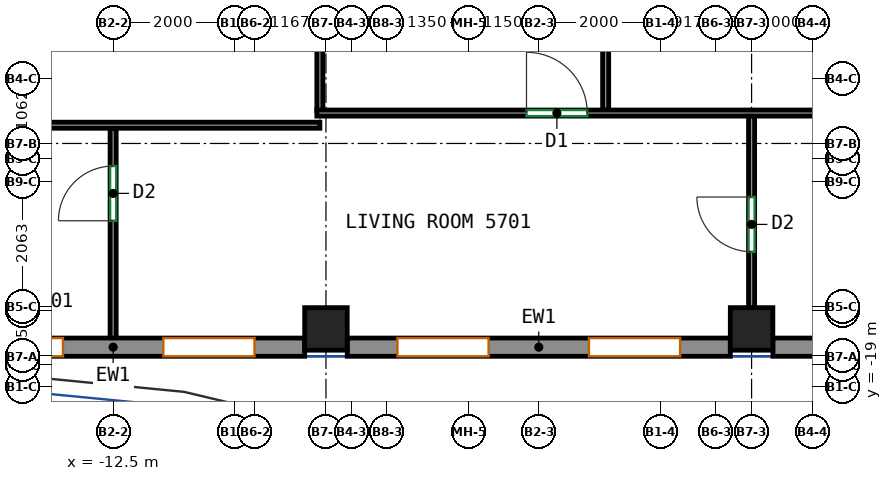
"""IFC4 building model, lengths in metres.
Left out: names, types, materials, properties, quantities, classifications, styles, units other than length and angle.
Written with IfcOpenShell. Run it as: python <this file> out.ifc"""

import sys

from ifc_helpers import new_model, si_unit, direction, frame, frame_2d, origin, origin_2d, place, context, subcontext, project, spatial, rectangle, extrude, source, transform, mapped, element, fill, save


model = new_model("IFC4")
c1 = context("Model", 3, precision=1e-05, world=origin(), true_north=direction((0.0, 1.0)))
c2 = subcontext(c1, "Body", "Model", "MODEL_VIEW")
j1 = project(units=[si_unit("LENGTHUNIT", "METRE"), si_unit("PLANEANGLEUNIT", "RADIAN")], contexts=[c1])
p1 = place(None, origin())
s1 = spatial("IfcSite", under=j1, at=p1, CompositionType="ELEMENT")
p2 = place(p1, origin())
s2 = spatial("IfcBuilding", under=s1, at=p2, CompositionType="ELEMENT")
p3 = place(p2, frame((0.0, 0.0, 239.0)))
s3 = spatial("IfcBuildingStorey", under=s2, at=p3, CompositionType="ELEMENT", Elevation=239.0)
m1 = source(origin(), c2, "Body", "SweptSolid", [
    extrude(rectangle(XDim=0.7, YDim=0.7, at=origin_2d()), origin(), (0.0, 0.0, 1.0), 3.12),
])
for number, where, z_axis, x_axis in (
    (1, (-9.0, -18.05, 0.0), (0.0, 0.0, 1.0), (1.0, 0.0, 0.0)),
    (2, (-2.0, -18.05, 0.0), (0.0, 0.0, 1.0), (1.0, 0.0, 0.0)),
):
    element("IfcColumn", number, at=place(p3, frame(where, z_axis=z_axis, x_axis=x_axis)), inside=s3, PredefinedType="COLUMN", context=c2, shape_type="MappedRepresentation", body=[
        mapped(m1, transform((0.0, 0.0, 0.0))),
    ])
m2 = source(origin(), c2, "Body", "SweptSolid", [
    extrude(rectangle(XDim=6.3, YDim=0.3, at=frame_2d((3.15, 0.0))), origin(), (0.0, 0.0, 1.0), 3.12),
])
p4 = place(p3, frame((-15.65, -18.35, 0.0), z_axis=(0.0, 0.0, 1.0), x_axis=(1.0, 0.0, 0.0)))
e3 = element("IfcWall", 3, at=p4, inside=s3, PredefinedType="SOLIDWALL", context=c2, shape_type="MappedRepresentation", body=[
    mapped(m2, transform((0.0, 0.0, 0.0))),
])
p5 = place(p4, frame((0.825, 0.0, 0.8)))
e4 = element("IfcOpeningElement", 4, at=p5, cuts=e3, PredefinedType="OPENING", context=c2, shape_type="SweptSolid", body=[
    extrude(rectangle(XDim=1.5, YDim=2.05, at=frame_2d((0.75, 1.025))), frame((0.0, 0.16, 0.0), z_axis=(0.0, -1.0, 0.0), x_axis=(1.0, 0.0, 0.0)), (0.0, 0.0, 1.0), 0.32),
])
p6 = place(p4, frame((3.975, 0.0, 0.8)))
e5 = element("IfcOpeningElement", 5, at=p6, cuts=e3, PredefinedType="OPENING", context=c2, shape_type="SweptSolid", body=[
    extrude(rectangle(XDim=1.5, YDim=2.05, at=frame_2d((0.75, 1.025))), frame((0.0, 0.16, 0.0), z_axis=(0.0, -1.0, 0.0), x_axis=(1.0, 0.0, 0.0)), (0.0, 0.0, 1.0), 0.32),
])
p7 = place(p3, frame((-8.65, -18.35, 0.0), z_axis=(0.0, 0.0, 1.0), x_axis=(1.0, 0.0, 0.0)))
e6 = element("IfcWall", 6, at=p7, inside=s3, PredefinedType="SOLIDWALL", context=c2, shape_type="MappedRepresentation", body=[
    mapped(m2, transform((0.0, 0.0, 0.0))),
])
p8 = place(p7, frame((0.825, 0.0, 0.8)))
e7 = element("IfcOpeningElement", 7, at=p8, cuts=e6, PredefinedType="OPENING", context=c2, shape_type="SweptSolid", body=[
    extrude(rectangle(XDim=1.5, YDim=2.05, at=frame_2d((0.75, 1.025))), frame((0.0, 0.16, 0.0), z_axis=(0.0, -1.0, 0.0), x_axis=(1.0, 0.0, 0.0)), (0.0, 0.0, 1.0), 0.32),
])
p9 = place(p7, frame((3.975, 0.0, 0.8)))
e8 = element("IfcOpeningElement", 8, at=p9, cuts=e6, PredefinedType="OPENING", context=c2, shape_type="SweptSolid", body=[
    extrude(rectangle(XDim=1.5, YDim=2.05, at=frame_2d((0.75, 1.025))), frame((0.0, 0.16, 0.0), z_axis=(0.0, -1.0, 0.0), x_axis=(1.0, 0.0, 0.0)), (0.0, 0.0, 1.0), 0.32),
])
p10 = place(p3, frame((-1.65, -18.35, 0.0), z_axis=(0.0, 0.0, 1.0), x_axis=(1.0, 0.0, 0.0)))
e9 = element("IfcWall", 9, at=p10, inside=s3, PredefinedType="SOLIDWALL", context=c2, shape_type="MappedRepresentation", body=[
    mapped(m2, transform((0.0, 0.0, 0.0))),
])
p11 = place(p10, frame((0.825, 0.0, 0.8)))
e10 = element("IfcOpeningElement", 10, at=p11, cuts=e9, PredefinedType="OPENING", context=c2, shape_type="SweptSolid", body=[
    extrude(rectangle(XDim=1.5, YDim=2.05, at=frame_2d((0.75, 1.025))), frame((0.0, 0.16, 0.0), z_axis=(0.0, -1.0, 0.0), x_axis=(1.0, 0.0, 0.0)), (0.0, 0.0, 1.0), 0.32),
])
p12 = place(p10, frame((3.975, 0.0, 0.8)))
e11 = element("IfcOpeningElement", 11, at=p12, cuts=e9, PredefinedType="OPENING", context=c2, shape_type="SweptSolid", body=[
    extrude(rectangle(XDim=1.5, YDim=2.05, at=frame_2d((0.75, 1.025))), frame((0.0, 0.16, 0.0), z_axis=(0.0, -1.0, 0.0), x_axis=(1.0, 0.0, 0.0)), (0.0, 0.0, 1.0), 0.32),
])
p13 = place(p3, frame((-9.1, -14.46, 0.0), z_axis=(0.0, 0.0, 1.0), x_axis=(0.0, 1.0, 0.0)))
e12 = element("IfcWall", 12, at=p13, inside=s3, PredefinedType="PARTITIONING", context=c2, shape_type="SweptSolid", body=[
    extrude(rectangle(XDim=2.583, YDim=0.1, at=frame_2d((1.292, 0.0))), origin(), (0.0, 0.0, 1.0), 3.12),
])
p14 = place(p13, frame((1.383, 0.0, 0.0)))
e13 = element("IfcOpeningElement", 13, at=p14, cuts=e12, PredefinedType="OPENING", context=c2, shape_type="SweptSolid", body=[
    extrude(rectangle(XDim=1.0, YDim=2.1, at=frame_2d((0.5, 1.05))), frame((0.0, 0.06, 0.0), z_axis=(0.0, -1.0, 0.0), x_axis=(1.0, 0.0, 0.0)), (0.0, 0.0, 1.0), 0.12),
])
p15 = place(p3, frame((-13.55, -14.7, 0.0), z_axis=(0.0, 0.0, 1.0), x_axis=(1.0, 0.0, 0.0)))
e14 = element("IfcWall", 14, at=p15, inside=s3, PredefinedType="PARTITIONING", context=c2, shape_type="SweptSolid", body=[
    extrude(rectangle(XDim=4.45, YDim=0.1, at=frame_2d((2.225, 0.0))), origin(), (0.0, 0.0, 1.0), 3.12),
])
p16 = place(p3, frame((-4.4, -14.45, 0.0), z_axis=(0.0, 0.0, 1.0), x_axis=(0.0, 1.0, 0.0)))
e15 = element("IfcWall", 15, at=p16, inside=s3, PredefinedType="PARTITIONING", context=c2, shape_type="SweptSolid", body=[
    extrude(rectangle(XDim=2.573, YDim=0.1, at=frame_2d((1.287, 0.0))), origin(), (0.0, 0.0, 1.0), 3.12),
])
p17 = place(p16, frame((1.266, 0.0, 0.0)))
e16 = element("IfcOpeningElement", 16, at=p17, cuts=e15, PredefinedType="OPENING", context=c2, shape_type="SweptSolid", body=[
    extrude(rectangle(XDim=1.0, YDim=2.1, at=frame_2d((0.5, 1.05))), frame((0.0, 0.06, 0.0), z_axis=(0.0, -1.0, 0.0), x_axis=(1.0, 0.0, 0.0)), (0.0, 0.0, 1.0), 0.12),
])
p18 = place(p3, frame((-9.15, -14.5, 0.0), z_axis=(0.0, 0.0, 1.0), x_axis=(1.0, 0.0, 0.0)))
e17 = element("IfcWall", 17, at=p18, inside=s3, PredefinedType="PARTITIONING", context=c2, shape_type="SweptSolid", body=[
    extrude(rectangle(XDim=14.25, YDim=0.1, at=frame_2d((7.125, 0.0))), origin(), (0.0, 0.0, 1.0), 3.12),
])
p19 = place(p18, frame((3.448, 0.0, 0.0)))
e18 = element("IfcOpeningElement", 18, at=p19, cuts=e17, PredefinedType="OPENING", context=c2, shape_type="SweptSolid", body=[
    extrude(rectangle(XDim=1.0, YDim=2.1, at=frame_2d((0.5, 1.05))), frame((0.0, 0.06, 0.0), z_axis=(0.0, -1.0, 0.0), x_axis=(1.0, 0.0, 0.0)), (0.0, 0.0, 1.0), 0.12),
])
p20 = place(p3, frame((-12.5, -18.25, 0.0), z_axis=(0.0, 0.0, 1.0), x_axis=(0.0, 1.0, 0.0)))
e19 = element("IfcWall", 19, at=p20, inside=s3, PredefinedType="PARTITIONING", context=c2, shape_type="SweptSolid", body=[
    extrude(rectangle(XDim=3.498, YDim=0.1, at=frame_2d((1.749, 0.0))), origin(), (0.0, 0.0, 1.0), 3.12),
])
p21 = place(p20, frame((1.979, 0.0, 0.0)))
e20 = element("IfcOpeningElement", 20, at=p21, cuts=e19, PredefinedType="OPENING", context=c2, shape_type="SweptSolid", body=[
    extrude(rectangle(XDim=0.9, YDim=2.1, at=frame_2d((0.45, 1.05))), frame((0.0, 0.06, 0.0), z_axis=(0.0, -1.0, 0.0), x_axis=(1.0, 0.0, 0.0)), (0.0, 0.0, 1.0), 0.12),
])
p22 = place(p3, frame((-2.0, -17.7, 0.0), z_axis=(0.0, 0.0, 1.0), x_axis=(0.0, 1.0, 0.0)))
e21 = element("IfcWall", 21, at=p22, inside=s3, PredefinedType="PARTITIONING", context=c2, shape_type="SweptSolid", body=[
    extrude(rectangle(XDim=3.148, YDim=0.1, at=frame_2d((1.574, 0.0))), origin(), (0.0, 0.0, 1.0), 3.12),
])
p23 = place(p22, frame((0.919, 0.0, 0.0)))
e22 = element("IfcOpeningElement", 22, at=p23, cuts=e21, PredefinedType="OPENING", context=c2, shape_type="SweptSolid", body=[
    extrude(rectangle(XDim=0.9, YDim=2.1, at=frame_2d((0.45, 1.05))), frame((0.0, 0.06, 0.0), z_axis=(0.0, -1.0, 0.0), x_axis=(1.0, 0.0, 0.0)), (0.0, 0.0, 1.0), 0.12),
])
p24 = place(p5, origin())
e23 = element("IfcWindow", 23, at=p24, inside=s3, PartitioningType="SINGLE_PANEL", PredefinedType="WINDOW", context=c2, shape_type="SweptSolid", body=[
    extrude(rectangle(XDim=1.5, YDim=2.05, at=frame_2d((0.75, 1.025))), frame((0.0, 0.03, 0.0), z_axis=(0.0, -1.0, 0.0), x_axis=(1.0, 0.0, 0.0)), (0.0, 0.0, 1.0), 0.06),
])
fill(e4, e23)
p25 = place(p6, origin())
e24 = element("IfcWindow", 24, at=p25, inside=s3, PartitioningType="SINGLE_PANEL", PredefinedType="WINDOW", context=c2, shape_type="SweptSolid", body=[
    extrude(rectangle(XDim=1.5, YDim=2.05, at=frame_2d((0.75, 1.025))), frame((0.0, 0.03, 0.0), z_axis=(0.0, -1.0, 0.0), x_axis=(1.0, 0.0, 0.0)), (0.0, 0.0, 1.0), 0.06),
])
fill(e5, e24)
p26 = place(p8, origin())
e25 = element("IfcWindow", 25, at=p26, inside=s3, PartitioningType="SINGLE_PANEL", PredefinedType="WINDOW", context=c2, shape_type="SweptSolid", body=[
    extrude(rectangle(XDim=1.5, YDim=2.05, at=frame_2d((0.75, 1.025))), frame((0.0, 0.03, 0.0), z_axis=(0.0, -1.0, 0.0), x_axis=(1.0, 0.0, 0.0)), (0.0, 0.0, 1.0), 0.06),
])
fill(e7, e25)
p27 = place(p9, origin())
e26 = element("IfcWindow", 26, at=p27, inside=s3, PartitioningType="SINGLE_PANEL", PredefinedType="WINDOW", context=c2, shape_type="SweptSolid", body=[
    extrude(rectangle(XDim=1.5, YDim=2.05, at=frame_2d((0.75, 1.025))), frame((0.0, 0.03, 0.0), z_axis=(0.0, -1.0, 0.0), x_axis=(1.0, 0.0, 0.0)), (0.0, 0.0, 1.0), 0.06),
])
fill(e8, e26)
p28 = place(p23, origin())
e27 = element("IfcDoor", 27, at=p28, inside=s3, OperationType="SINGLE_SWING_RIGHT", PredefinedType="DOOR", context=c2, shape_type="SweptSolid", body=[
    extrude(rectangle(XDim=0.9, YDim=2.1, at=frame_2d((0.45, 1.05))), frame((0.0, 0.025, 0.0), z_axis=(0.0, -1.0, 0.0), x_axis=(1.0, 0.0, 0.0)), (0.0, 0.0, 1.0), 0.05),
])
fill(e22, e27)
p29 = place(p21, origin())
e28 = element("IfcDoor", 28, at=p29, inside=s3, OperationType="SINGLE_SWING_LEFT", PredefinedType="DOOR", context=c2, shape_type="SweptSolid", body=[
    extrude(rectangle(XDim=0.9, YDim=2.1, at=frame_2d((0.45, 1.05))), frame((0.0, 0.025, 0.0), z_axis=(0.0, -1.0, 0.0), x_axis=(1.0, 0.0, 0.0)), (0.0, 0.0, 1.0), 0.05),
])
fill(e20, e28)
p30 = place(p19, origin())
e29 = element("IfcDoor", 29, at=p30, inside=s3, OperationType="SINGLE_SWING_LEFT", PredefinedType="DOOR", context=c2, shape_type="SweptSolid", body=[
    extrude(rectangle(XDim=1.0, YDim=2.1, at=frame_2d((0.5, 1.05))), frame((0.0, 0.025, 0.0), z_axis=(0.0, -1.0, 0.0), x_axis=(1.0, 0.0, 0.0)), (0.0, 0.0, 1.0), 0.05),
])
fill(e18, e29)
save(model, sys.argv[1])
